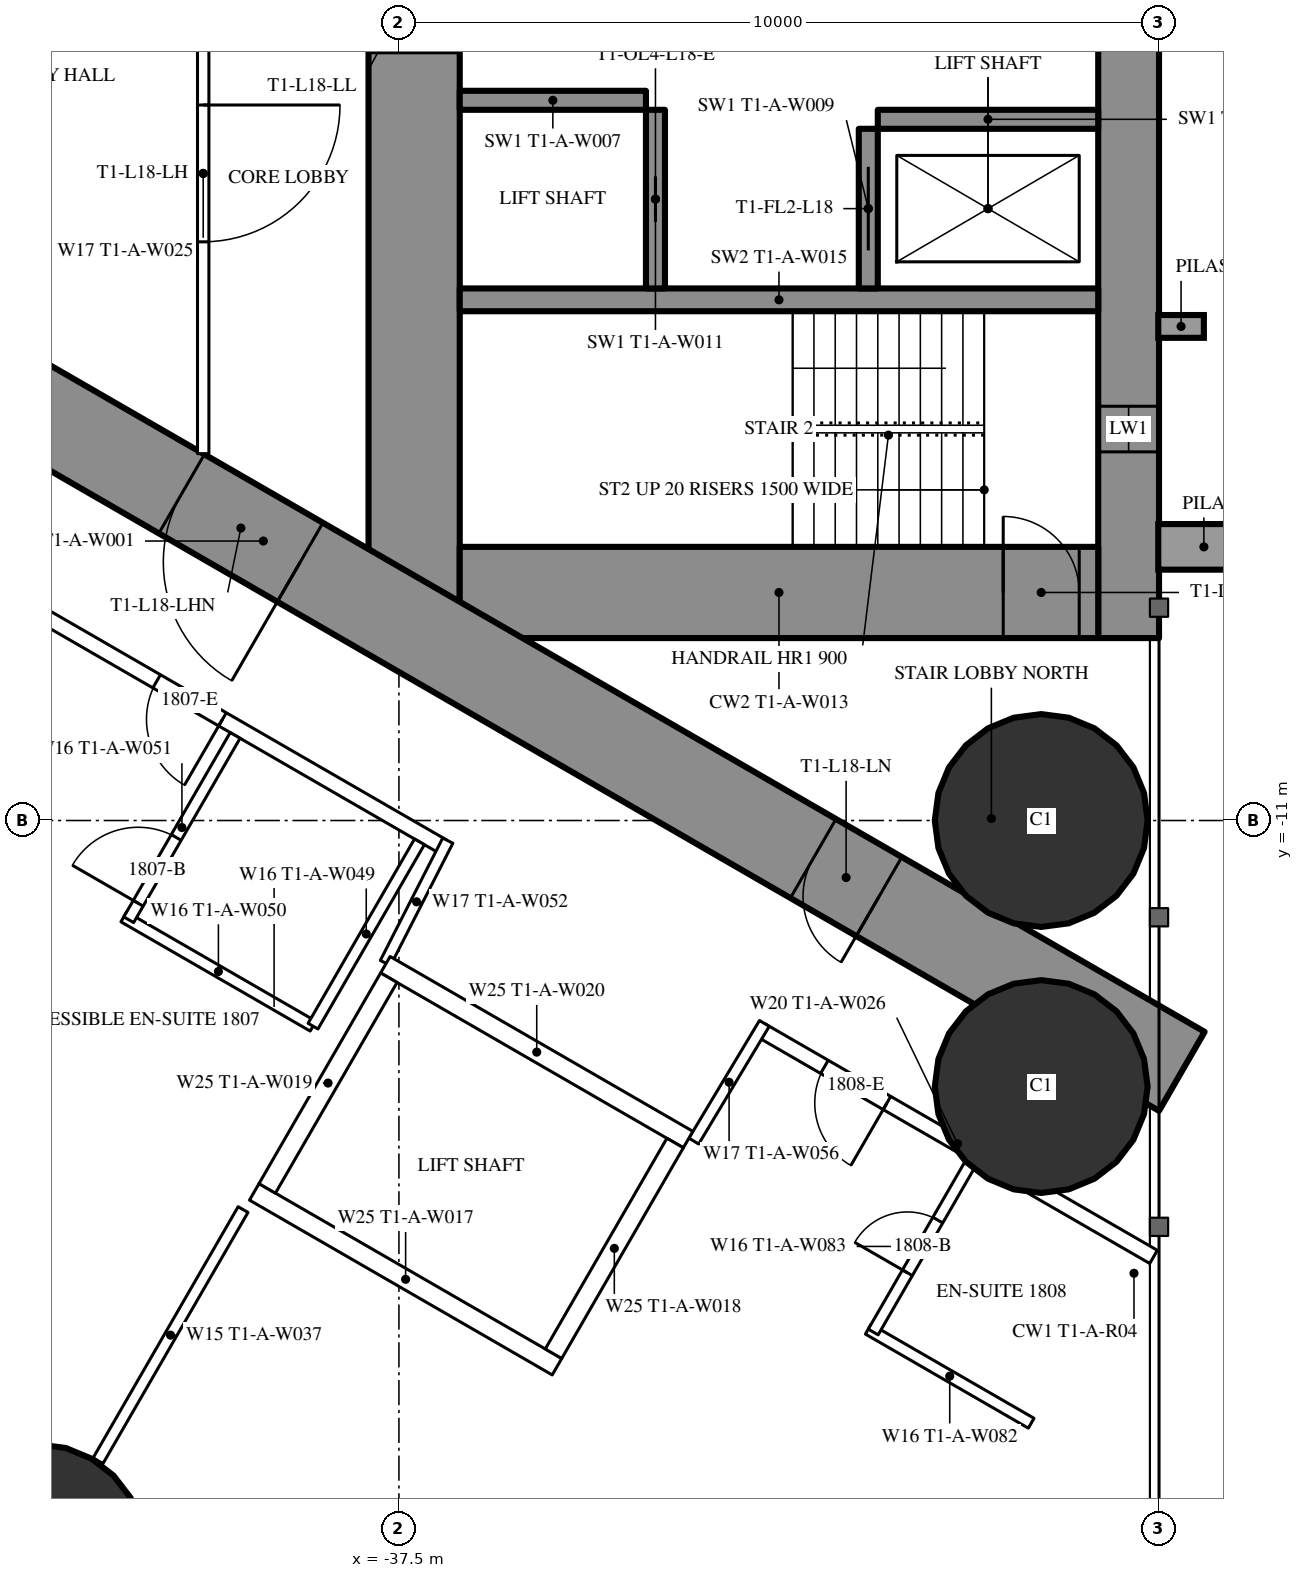
"""IFC4 building model, lengths in metres.
Left out: names, types, materials, properties, quantities, classifications, styles, units other than length and angle.
Written with IfcOpenShell. Run it as: python <this file> out.ifc"""

import sys

from ifc_helpers import new_model, si_unit, direction, frame, frame_2d, origin, origin_2d, place, context, subcontext, project, spatial, rectangle, hollow_circle, extrude, element, fill, save


model = new_model("IFC4")
c1 = context("Model", 3, precision=1e-05, world=origin(), true_north=direction((0.0, 1.0)))
c2 = subcontext(c1, "Body", "Model", "MODEL_VIEW")
j1 = project(units=[si_unit("LENGTHUNIT", "METRE"), si_unit("PLANEANGLEUNIT", "RADIAN")], contexts=[c1])
p1 = place(None, origin())
s1 = spatial("IfcSite", under=j1, at=p1, CompositionType="ELEMENT")
p2 = place(p1, origin())
s2 = spatial("IfcBuilding", under=s1, at=p2, CompositionType="ELEMENT")
p3 = place(p2, frame((0.0, 0.0, 70.5)))
s3 = spatial("IfcBuildingStorey", under=s2, at=p3, CompositionType="ELEMENT", Elevation=70.5)
for number, where, z_axis, x_axis in (
    (1, (-29.05, -11.0, 0.0), (0.0, 0.0, 1.0), (1.0, 0.0, 0.0)),
    (2, (-29.05, -14.5, 0.0), (0.0, 0.0, 1.0), (1.0, 0.0, 0.0)),
    (3, (-42.245, -20.607, 0.0), (0.0, 0.0, 1.0), (1.0, 0.0, 0.0)),
):
    element("IfcColumn", number, at=place(p3, frame(where, z_axis=z_axis, x_axis=x_axis)), inside=s3, PredefinedType="COLUMN", context=c2, shape_type="SweptSolid", body=[
        extrude(hollow_circle(Radius=1.4, WallThickness=0.12, at=origin_2d()), origin(), (0.0, 0.0, 1.0), 3.5),
    ])
p4 = place(p3, frame((-27.9, 8.6, 0.0), z_axis=(0.0, 0.0, 1.0), x_axis=(0.0, -1.0, 0.0)))
e4 = element("IfcWall", 4, at=p4, inside=s3, PredefinedType="SHEAR", context=c2, shape_type="SweptSolid", body=[
    extrude(rectangle(XDim=17.2, YDim=0.8, at=frame_2d((8.6, 0.0))), origin(), (0.0, 0.0, 1.0), 3.5),
])
p5 = place(p4, frame((2.45, 0.0, 0.6)))
e5 = element("IfcOpeningElement", 5, at=p5, cuts=e4, PredefinedType="OPENING", context=c2, shape_type="SweptSolid", body=[
    extrude(rectangle(XDim=0.6, YDim=2.1, at=frame_2d((0.3, 1.05))), frame((0.0, 0.41, 0.0), z_axis=(0.0, -1.0, 0.0), x_axis=(1.0, 0.0, 0.0)), (0.0, 0.0, 1.0), 0.82),
])
p6 = place(p4, frame((14.15, 0.0, 0.6)))
e6 = element("IfcOpeningElement", 6, at=p6, cuts=e4, PredefinedType="OPENING", context=c2, shape_type="SweptSolid", body=[
    extrude(rectangle(XDim=0.6, YDim=2.1, at=frame_2d((0.3, 1.05))), frame((0.0, 0.41, 0.0), z_axis=(0.0, -1.0, 0.0), x_axis=(1.0, 0.0, 0.0)), (0.0, 0.0, 1.0), 0.82),
])
p7 = place(p3, frame((-37.3, 8.6, 0.0), z_axis=(0.0, 0.0, 1.0), x_axis=(0.0, -1.0, 0.0)))
e7 = element("IfcWall", 7, at=p7, inside=s3, PredefinedType="SHEAR", context=c2, shape_type="SweptSolid", body=[
    extrude(rectangle(XDim=17.2, YDim=1.2, at=frame_2d((8.6, 0.0))), origin(), (0.0, 0.0, 1.0), 3.5),
])
p8 = place(p7, frame((7.7, 0.0, 0.0)))
e8 = element("IfcOpeningElement", 8, at=p8, cuts=e7, PredefinedType="OPENING", context=c2, shape_type="SweptSolid", body=[
    extrude(rectangle(XDim=1.8, YDim=2.2, at=frame_2d((0.9, 1.1))), frame((0.0, 0.61, 0.0), z_axis=(0.0, -1.0, 0.0), x_axis=(1.0, 0.0, 0.0)), (0.0, 0.0, 1.0), 1.22),
])
p9 = place(p3, frame((-28.3, -8.0, 0.0), z_axis=(0.0, 0.0, 1.0), x_axis=(-1.0, 0.0, 0.0)))
e9 = element("IfcWall", 9, at=p9, inside=s3, PredefinedType="SHEAR", context=c2, shape_type="SweptSolid", body=[
    extrude(rectangle(XDim=8.4, YDim=1.2, at=frame_2d((4.2, 0.0))), origin(), (0.0, 0.0, 1.0), 3.5),
])
p10 = place(p9, frame((0.25, 0.0, 0.0)))
e10 = element("IfcOpeningElement", 10, at=p10, cuts=e9, PredefinedType="OPENING", context=c2, shape_type="SweptSolid", body=[
    extrude(rectangle(XDim=1.0, YDim=2.2, at=frame_2d((0.5, 1.1))), frame((0.0, 0.61, 0.0), z_axis=(0.0, -1.0, 0.0), x_axis=(1.0, 0.0, 0.0)), (0.0, 0.0, 1.0), 1.22),
])
p11 = place(p3, frame((-28.3, -4.15, 0.0), z_axis=(0.0, 0.0, 1.0), x_axis=(-1.0, 0.0, 0.0)))
e11 = element("IfcWall", 11, at=p11, inside=s3, PredefinedType="SHEAR", context=c2, shape_type="SweptSolid", body=[
    extrude(rectangle(XDim=8.4, YDim=0.3, at=frame_2d((4.2, 0.0))), origin(), (0.0, 0.0, 1.0), 3.5),
])
p12 = place(p3, frame((-31.325, -1.9, 0.0), z_axis=(0.0, 0.0, 1.0), x_axis=(0.0, -1.0, 0.0)))
e12 = element("IfcWall", 12, at=p12, inside=s3, PredefinedType="SHEAR", context=c2, shape_type="SweptSolid", body=[
    extrude(rectangle(XDim=2.1, YDim=0.25, at=frame_2d((1.05, 0.0))), origin(), (0.0, 0.0, 1.0), 3.5),
])
p13 = place(p12, frame((0.5, 0.0, 0.0)))
e13 = element("IfcOpeningElement", 13, at=p13, cuts=e12, PredefinedType="OPENING", context=c2, shape_type="SweptSolid", body=[
    extrude(rectangle(XDim=1.1, YDim=2.2, at=frame_2d((0.55, 1.1))), frame((0.0, 0.135, 0.0), z_axis=(0.0, -1.0, 0.0), x_axis=(1.0, 0.0, 0.0)), (0.0, 0.0, 1.0), 0.27),
])
p14 = place(p3, frame((-34.125, -1.65, 0.0), z_axis=(0.0, 0.0, 1.0), x_axis=(0.0, -1.0, 0.0)))
e14 = element("IfcWall", 14, at=p14, inside=s3, PredefinedType="SHEAR", context=c2, shape_type="SweptSolid", body=[
    extrude(rectangle(XDim=2.35, YDim=0.25, at=frame_2d((1.175, 0.0))), origin(), (0.0, 0.0, 1.0), 3.5),
])
p15 = place(p14, frame((0.875, 0.0, 0.0)))
e15 = element("IfcOpeningElement", 15, at=p15, cuts=e14, PredefinedType="OPENING", context=c2, shape_type="SweptSolid", body=[
    extrude(rectangle(XDim=0.6, YDim=2.0, at=frame_2d((0.3, 1.0))), frame((0.0, 0.135, 0.0), z_axis=(0.0, -1.0, 0.0), x_axis=(1.0, 0.0, 0.0)), (0.0, 0.0, 1.0), 0.27),
])
p16 = place(p3, frame((-28.3, -1.775, 0.0), z_axis=(0.0, 0.0, 1.0), x_axis=(-1.0, 0.0, 0.0)))
e16 = element("IfcWall", 16, at=p16, inside=s3, PredefinedType="SHEAR", context=c2, shape_type="SweptSolid", body=[
    extrude(rectangle(XDim=2.9, YDim=0.25, at=frame_2d((1.45, 0.0))), origin(), (0.0, 0.0, 1.0), 3.5),
])
p17 = place(p3, frame((-34.25, -1.525, 0.0), z_axis=(0.0, 0.0, 1.0), x_axis=(-1.0, 0.0, 0.0)))
e17 = element("IfcWall", 17, at=p17, inside=s3, PredefinedType="SHEAR", context=c2, shape_type="SweptSolid", body=[
    extrude(rectangle(XDim=2.45, YDim=0.25, at=frame_2d((1.225, 0.0))), origin(), (0.0, 0.0, 1.0), 3.5),
])
p18 = place(p3, frame((-27.2, -14.3, 0.0), z_axis=(0.0, 0.0, 1.0), x_axis=(-0.866024021859, 0.500002393557, 0.0)))
e18 = element("IfcWall", 18, at=p18, inside=s3, PredefinedType="SHEAR", context=c2, shape_type="SweptSolid", body=[
    extrude(rectangle(XDim=27.907, YDim=1.2, at=frame_2d((13.954, 0.0))), origin(), (0.0, 0.0, 1.0), 3.5),
])
p19 = place(p18, frame((4.6, 0.0, 0.0)))
e19 = element("IfcOpeningElement", 19, at=p19, cuts=e18, PredefinedType="OPENING", context=c2, shape_type="SweptSolid", body=[
    extrude(rectangle(XDim=1.0, YDim=2.2, at=frame_2d((0.5, 1.1))), frame((0.0, 0.61, 0.0), z_axis=(0.0, -1.0, 0.0), x_axis=(1.0, 0.0, 0.0)), (0.0, 0.0, 1.0), 1.22),
])
p20 = place(p18, frame((13.395, 0.0, 0.0)))
e20 = element("IfcOpeningElement", 20, at=p20, cuts=e18, PredefinedType="OPENING", context=c2, shape_type="SweptSolid", body=[
    extrude(rectangle(XDim=1.8, YDim=2.2, at=frame_2d((0.9, 1.1))), frame((0.0, 0.61, 0.0), z_axis=(0.0, -1.0, 0.0), x_axis=(1.0, 0.0, 0.0)), (0.0, 0.0, 1.0), 1.22),
])
p21 = place(p3, frame((-39.551, -16.118, 0.0), z_axis=(0.0, 0.0, 1.0), x_axis=(-0.499986503906, -0.866033195618, 0.0)))
e21 = element("IfcWall", 21, at=p21, inside=s3, PredefinedType="PARTITIONING", context=c2, shape_type="SweptSolid", body=[
    extrude(rectangle(XDim=3.815, YDim=0.15, at=frame_2d((1.907, 0.0))), origin(), (0.0, 0.0, 1.0), 3.25),
])
p22 = place(p3, frame((-27.572, -16.741, 0.0), z_axis=(0.0, 0.0, 1.0), x_axis=(-0.866024464444, 0.500001626982, 0.0)))
e22 = element("IfcWall", 22, at=p22, inside=s3, PredefinedType="PARTITIONING", context=c2, shape_type="SweptSolid", body=[
    extrude(rectangle(XDim=5.955, YDim=0.2, at=frame_2d((2.978, 0.0))), origin(), (0.0, 0.0, 1.0), 3.25),
])
p23 = place(p22, frame((4.05, 0.0, 0.0)))
e23 = element("IfcOpeningElement", 23, at=p23, cuts=e22, PredefinedType="OPENING", context=c2, shape_type="SweptSolid", body=[
    extrude(rectangle(XDim=0.95, YDim=2.2, at=frame_2d((0.475, 1.1))), frame((0.0, 0.11, 0.0), z_axis=(0.0, -1.0, 0.0), x_axis=(1.0, 0.0, 0.0)), (0.0, 0.0, 1.0), 0.22),
])
p24 = place(p3, frame((-36.92, -11.344, 0.0), z_axis=(0.0, 0.0, 1.0), x_axis=(-0.866028313256, 0.499994960614, 0.0)))
e24 = element("IfcWall", 24, at=p24, inside=s3, PredefinedType="PARTITIONING", context=c2, shape_type="SweptSolid", body=[
    extrude(rectangle(XDim=22.568, YDim=0.2, at=frame_2d((11.284, 0.0))), origin(), (0.0, 0.0, 1.0), 3.25),
])
p25 = place(p24, frame((20.958, 0.0, 0.0)))
e25 = element("IfcOpeningElement", 25, at=p25, cuts=e24, PredefinedType="OPENING", context=c2, shape_type="SweptSolid", body=[
    extrude(rectangle(XDim=0.95, YDim=2.2, at=frame_2d((0.475, 1.1))), frame((0.0, 0.11, 0.0), z_axis=(0.0, -1.0, 0.0), x_axis=(1.0, 0.0, 0.0)), (0.0, 0.0, 1.0), 0.22),
])
p26 = place(p24, frame((12.68, 0.0, 0.0)))
e26 = element("IfcOpeningElement", 26, at=p26, cuts=e24, PredefinedType="OPENING", context=c2, shape_type="SweptSolid", body=[
    extrude(rectangle(XDim=0.95, YDim=2.2, at=frame_2d((0.475, 1.1))), frame((0.0, 0.11, 0.0), z_axis=(0.0, -1.0, 0.0), x_axis=(1.0, 0.0, 0.0)), (0.0, 0.0, 1.0), 0.22),
])
p27 = place(p24, frame((3.35, 0.0, 0.0)))
e27 = element("IfcOpeningElement", 27, at=p27, cuts=e24, PredefinedType="OPENING", context=c2, shape_type="SweptSolid", body=[
    extrude(rectangle(XDim=1.0, YDim=2.2, at=frame_2d((0.5, 1.1))), frame((0.0, 0.11, 0.0), z_axis=(0.0, -1.0, 0.0), x_axis=(1.0, 0.0, 0.0)), (0.0, 0.0, 1.0), 0.22),
])
p28 = place(p3, frame((-36.857, -11.265, 0.0), z_axis=(0.0, 0.0, 1.0), x_axis=(-0.454225294761, -0.890886851176, 0.0)))
e28 = element("IfcWall", 28, at=p28, inside=s3, PredefinedType="PARTITIONING", context=c2, shape_type="SweptSolid", body=[
    extrude(rectangle(XDim=1.807, YDim=0.15, at=frame_2d((0.904, 0.0))), origin(), (0.0, 0.0, 1.0), 3.25),
])
p29 = place(p3, frame((-33.621, -15.218, 0.0), z_axis=(0.0, 0.0, 1.0), x_axis=(0.514336634837, 0.857588377991, 0.0)))
e29 = element("IfcWall", 29, at=p29, inside=s3, PredefinedType="PARTITIONING", context=c2, shape_type="SweptSolid", body=[
    extrude(rectangle(XDim=1.805, YDim=0.15, at=frame_2d((0.903, 0.0))), origin(), (0.0, 0.0, 1.0), 3.25),
])
p30 = place(p3, frame((-38.63, -13.705, 0.0), z_axis=(0.0, 0.0, 1.0), x_axis=(-0.866018712932, 0.500011588718, 0.0)))
e30 = element("IfcWall", 30, at=p30, inside=s3, PredefinedType="PARTITIONING", context=c2, shape_type="SweptSolid", body=[
    extrude(rectangle(XDim=2.875, YDim=0.15, at=frame_2d((1.438, 0.0))), origin(), (0.0, 0.0, 1.0), 3.25),
])
p31 = place(p3, frame((-39.655, -9.88, 0.0), z_axis=(0.0, 0.0, 1.0), x_axis=(-0.500049511043, -0.865996816683, 0.0)))
e31 = element("IfcWall", 31, at=p31, inside=s3, PredefinedType="PARTITIONING", context=c2, shape_type="SweptSolid", body=[
    extrude(rectangle(XDim=2.8, YDim=0.15, at=frame_2d((1.4, 0.0))), origin(), (0.0, 0.0, 1.0), 3.25),
])
p32 = place(p31, frame((1.55, 0.0, 0.0)))
e32 = element("IfcOpeningElement", 32, at=p32, cuts=e31, PredefinedType="OPENING", context=c2, shape_type="SweptSolid", body=[
    extrude(rectangle(XDim=1.0, YDim=2.2, at=frame_2d((0.5, 1.1))), frame((0.0, 0.085, 0.0), z_axis=(0.0, -1.0, 0.0), x_axis=(1.0, 0.0, 0.0)), (0.0, 0.0, 1.0), 0.17),
])
p33 = place(p3, frame((-37.23, -11.281, 0.0), z_axis=(0.0, 0.0, 1.0), x_axis=(-0.500049511043, -0.865996816683, 0.0)))
e33 = element("IfcWall", 33, at=p33, inside=s3, PredefinedType="PARTITIONING", context=c2, shape_type="SweptSolid", body=[
    extrude(rectangle(XDim=2.8, YDim=0.15, at=frame_2d((1.4, 0.0))), origin(), (0.0, 0.0, 1.0), 3.25),
])
p34 = place(p3, frame((-29.182, -18.929, 0.0), z_axis=(0.0, 0.0, 1.0), x_axis=(-0.866006523861, 0.500032699561, 0.0)))
e34 = element("IfcWall", 34, at=p34, inside=s3, PredefinedType="PARTITIONING", context=c2, shape_type="SweptSolid", body=[
    extrude(rectangle(XDim=2.475, YDim=0.15, at=frame_2d((1.237, 0.0))), origin(), (0.0, 0.0, 1.0), 3.25),
])
p35 = place(p3, frame((-29.96, -15.478, 0.0), z_axis=(0.0, 0.0, 1.0), x_axis=(-0.500006934395, -0.866021400173, 0.0)))
e35 = element("IfcWall", 35, at=p35, inside=s3, PredefinedType="PARTITIONING", context=c2, shape_type="SweptSolid", body=[
    extrude(rectangle(XDim=2.6, YDim=0.15, at=frame_2d((1.3, 0.0))), origin(), (0.0, 0.0, 1.0), 3.25),
])
p36 = place(p35, frame((0.9, 0.0, 0.0)))
e36 = element("IfcOpeningElement", 36, at=p36, cuts=e35, PredefinedType="OPENING", context=c2, shape_type="SweptSolid", body=[
    extrude(rectangle(XDim=0.8, YDim=2.2, at=frame_2d((0.4, 1.1))), frame((0.0, 0.085, 0.0), z_axis=(0.0, -1.0, 0.0), x_axis=(1.0, 0.0, 0.0)), (0.0, 0.0, 1.0), 0.17),
])
p37 = place(p3, frame((-40.075, 1.2, 0.0), z_axis=(0.0, 0.0, 1.0), x_axis=(0.0, -1.0, 0.0)))
e37 = element("IfcWall", 37, at=p37, inside=s3, PredefinedType="PARTITIONING", context=c2, shape_type="SweptSolid", body=[
    extrude(rectangle(XDim=7.374, YDim=0.15, at=frame_2d((3.687, 0.0))), origin(), (0.0, 0.0, 1.0), 3.25),
])
p38 = place(p37, frame((2.787, 0.0, 0.0)))
e38 = element("IfcOpeningElement", 38, at=p38, cuts=e37, PredefinedType="OPENING", context=c2, shape_type="SweptSolid", body=[
    extrude(rectangle(XDim=1.8, YDim=2.2, at=frame_2d((0.9, 1.1))), frame((0.0, 0.085, 0.0), z_axis=(0.0, -1.0, 0.0), x_axis=(1.0, 0.0, 0.0)), (0.0, 0.0, 1.0), 0.17),
])
p39 = place(p3, frame((-33.696, -15.197, 0.0), z_axis=(0.0, 0.0, 1.0), x_axis=(-0.865976953817, 0.500083908417, 0.0)))
e39 = element("IfcWall", 39, at=p39, inside=s3, PredefinedType="PARTITIONING", context=c2, shape_type="SweptSolid", body=[
    extrude(rectangle(XDim=4.599, YDim=0.25, at=frame_2d((2.3, 0.0))), origin(), (0.0, 0.0, 1.0), 3.25),
])
p40 = place(p3, frame((-35.42, -18.186, 0.0), z_axis=(0.0, 0.0, 1.0), x_axis=(-0.865990227814, 0.50006092162, 0.0)))
e40 = element("IfcWall", 40, at=p40, inside=s3, PredefinedType="PARTITIONING", context=c2, shape_type="SweptSolid", body=[
    extrude(rectangle(XDim=4.6, YDim=0.25, at=frame_2d((2.3, 0.0))), origin(), (0.0, 0.0, 1.0), 3.25),
])
p41 = place(p3, frame((-33.866, -15.243, 0.0), z_axis=(0.0, 0.0, 1.0), x_axis=(-0.499929347863, -0.866066190972, 0.0)))
e41 = element("IfcWall", 41, at=p41, inside=s3, PredefinedType="PARTITIONING", context=c2, shape_type="SweptSolid", body=[
    extrude(rectangle(XDim=3.201, YDim=0.25, at=frame_2d((1.6, 0.0))), origin(), (0.0, 0.0, 1.0), 3.25),
])
p42 = place(p3, frame((-37.633, -13.068, 0.0), z_axis=(0.0, 0.0, 1.0), x_axis=(-0.499872130319, -0.866099216793, 0.0)))
e42 = element("IfcWall", 42, at=p42, inside=s3, PredefinedType="PARTITIONING", context=c2, shape_type="SweptSolid", body=[
    extrude(rectangle(XDim=3.2, YDim=0.25, at=frame_2d((1.6, 0.0))), origin(), (0.0, 0.0, 1.0), 3.25),
])
p43 = place(p32, origin())
e43 = element("IfcDoor", 43, at=p43, inside=s3, OperationType="SINGLE_SWING_RIGHT", PredefinedType="DOOR", context=c2, shape_type="SweptSolid", body=[
    extrude(rectangle(XDim=1.0, YDim=2.2, at=frame_2d((0.5, 1.1))), frame((0.0, 0.025, 0.0), z_axis=(0.0, -1.0, 0.0), x_axis=(1.0, 0.0, 0.0)), (0.0, 0.0, 1.0), 0.05),
])
fill(e32, e43)
p44 = place(p27, origin())
e44 = element("IfcDoor", 44, at=p44, inside=s3, OperationType="SINGLE_SWING_LEFT", PredefinedType="DOOR", context=c2, shape_type="SweptSolid", body=[
    extrude(rectangle(XDim=1.0, YDim=2.2, at=frame_2d((0.5, 1.1))), frame((0.0, 0.025, 0.0), z_axis=(0.0, -1.0, 0.0), x_axis=(1.0, 0.0, 0.0)), (0.0, 0.0, 1.0), 0.05),
])
fill(e27, e44)
p45 = place(p36, origin())
e45 = element("IfcDoor", 45, at=p45, inside=s3, OperationType="SINGLE_SWING_RIGHT", PredefinedType="DOOR", context=c2, shape_type="SweptSolid", body=[
    extrude(rectangle(XDim=0.8, YDim=2.2, at=frame_2d((0.4, 1.1))), frame((0.0, 0.025, 0.0), z_axis=(0.0, -1.0, 0.0), x_axis=(1.0, 0.0, 0.0)), (0.0, 0.0, 1.0), 0.05),
])
fill(e36, e45)
p46 = place(p23, origin())
e46 = element("IfcDoor", 46, at=p46, inside=s3, OperationType="SINGLE_SWING_LEFT", PredefinedType="DOOR", context=c2, shape_type="SweptSolid", body=[
    extrude(rectangle(XDim=0.95, YDim=2.2, at=frame_2d((0.475, 1.1))), frame((0.0, 0.025, 0.0), z_axis=(0.0, -1.0, 0.0), x_axis=(1.0, 0.0, 0.0)), (0.0, 0.0, 1.0), 0.05),
])
fill(e23, e46)
p47 = place(p38, origin())
e47 = element("IfcDoor", 47, at=p47, inside=s3, OperationType="DOUBLE_DOOR_SINGLE_SWING", PredefinedType="DOOR", context=c2, shape_type="SweptSolid", body=[
    extrude(rectangle(XDim=1.8, YDim=2.2, at=frame_2d((0.9, 1.1))), frame((0.0, 0.025, 0.0), z_axis=(0.0, -1.0, 0.0), x_axis=(1.0, 0.0, 0.0)), (0.0, 0.0, 1.0), 0.05),
])
fill(e38, e47)
p48 = place(p19, origin())
e48 = element("IfcDoor", 48, at=p48, inside=s3, OperationType="SINGLE_SWING_LEFT", PredefinedType="DOOR", context=c2, shape_type="SweptSolid", body=[
    extrude(rectangle(XDim=1.0, YDim=2.2, at=frame_2d((0.5, 1.1))), frame((0.0, 0.025, 0.0), z_axis=(0.0, -1.0, 0.0), x_axis=(1.0, 0.0, 0.0)), (0.0, 0.0, 1.0), 0.05),
])
fill(e19, e48)
p49 = place(p20, origin())
e49 = element("IfcDoor", 49, at=p49, inside=s3, OperationType="DOUBLE_DOOR_SINGLE_SWING", PredefinedType="DOOR", context=c2, shape_type="SweptSolid", body=[
    extrude(rectangle(XDim=1.8, YDim=2.2, at=frame_2d((0.9, 1.1))), frame((0.0, 0.025, 0.0), z_axis=(0.0, -1.0, 0.0), x_axis=(1.0, 0.0, 0.0)), (0.0, 0.0, 1.0), 0.05),
])
fill(e20, e49)
p50 = place(p10, origin())
e50 = element("IfcDoor", 50, at=p50, inside=s3, OperationType="SINGLE_SWING_RIGHT", PredefinedType="DOOR", context=c2, shape_type="SweptSolid", body=[
    extrude(rectangle(XDim=1.0, YDim=2.2, at=frame_2d((0.5, 1.1))), frame((0.0, 0.025, 0.0), z_axis=(0.0, -1.0, 0.0), x_axis=(1.0, 0.0, 0.0)), (0.0, 0.0, 1.0), 0.05),
])
fill(e10, e50)
p51 = place(p13, origin())
e51 = element("IfcDoor", 51, at=p51, inside=s3, OperationType="SLIDING_TO_LEFT", PredefinedType="USERDEFINED", context=c2, shape_type="SweptSolid", body=[
    extrude(rectangle(XDim=1.1, YDim=2.2, at=frame_2d((0.55, 1.1))), frame((0.0, 0.025, 0.0), z_axis=(0.0, -1.0, 0.0), x_axis=(1.0, 0.0, 0.0)), (0.0, 0.0, 1.0), 0.05),
])
fill(e13, e51)
p52 = place(p15, origin())
e52 = element("IfcDoor", 52, at=p52, inside=s3, OperationType="SLIDING_TO_LEFT", PredefinedType="DOOR", context=c2, shape_type="SweptSolid", body=[
    extrude(rectangle(XDim=0.6, YDim=2.0, at=frame_2d((0.3, 1.0))), frame((0.0, 0.025, 0.0), z_axis=(0.0, -1.0, 0.0), x_axis=(1.0, 0.0, 0.0)), (0.0, 0.0, 1.0), 0.05),
])
fill(e15, e52)
p53 = place(p6, origin())
e53 = element("IfcWindow", 53, at=p53, inside=s3, PartitioningType="SINGLE_PANEL", PredefinedType="WINDOW", context=c2, shape_type="SweptSolid", body=[
    extrude(rectangle(XDim=0.6, YDim=2.1, at=frame_2d((0.3, 1.05))), frame((0.0, 0.03, 0.0), z_axis=(0.0, -1.0, 0.0), x_axis=(1.0, 0.0, 0.0)), (0.0, 0.0, 1.0), 0.06),
])
fill(e6, e53)
save(model, sys.argv[1])
